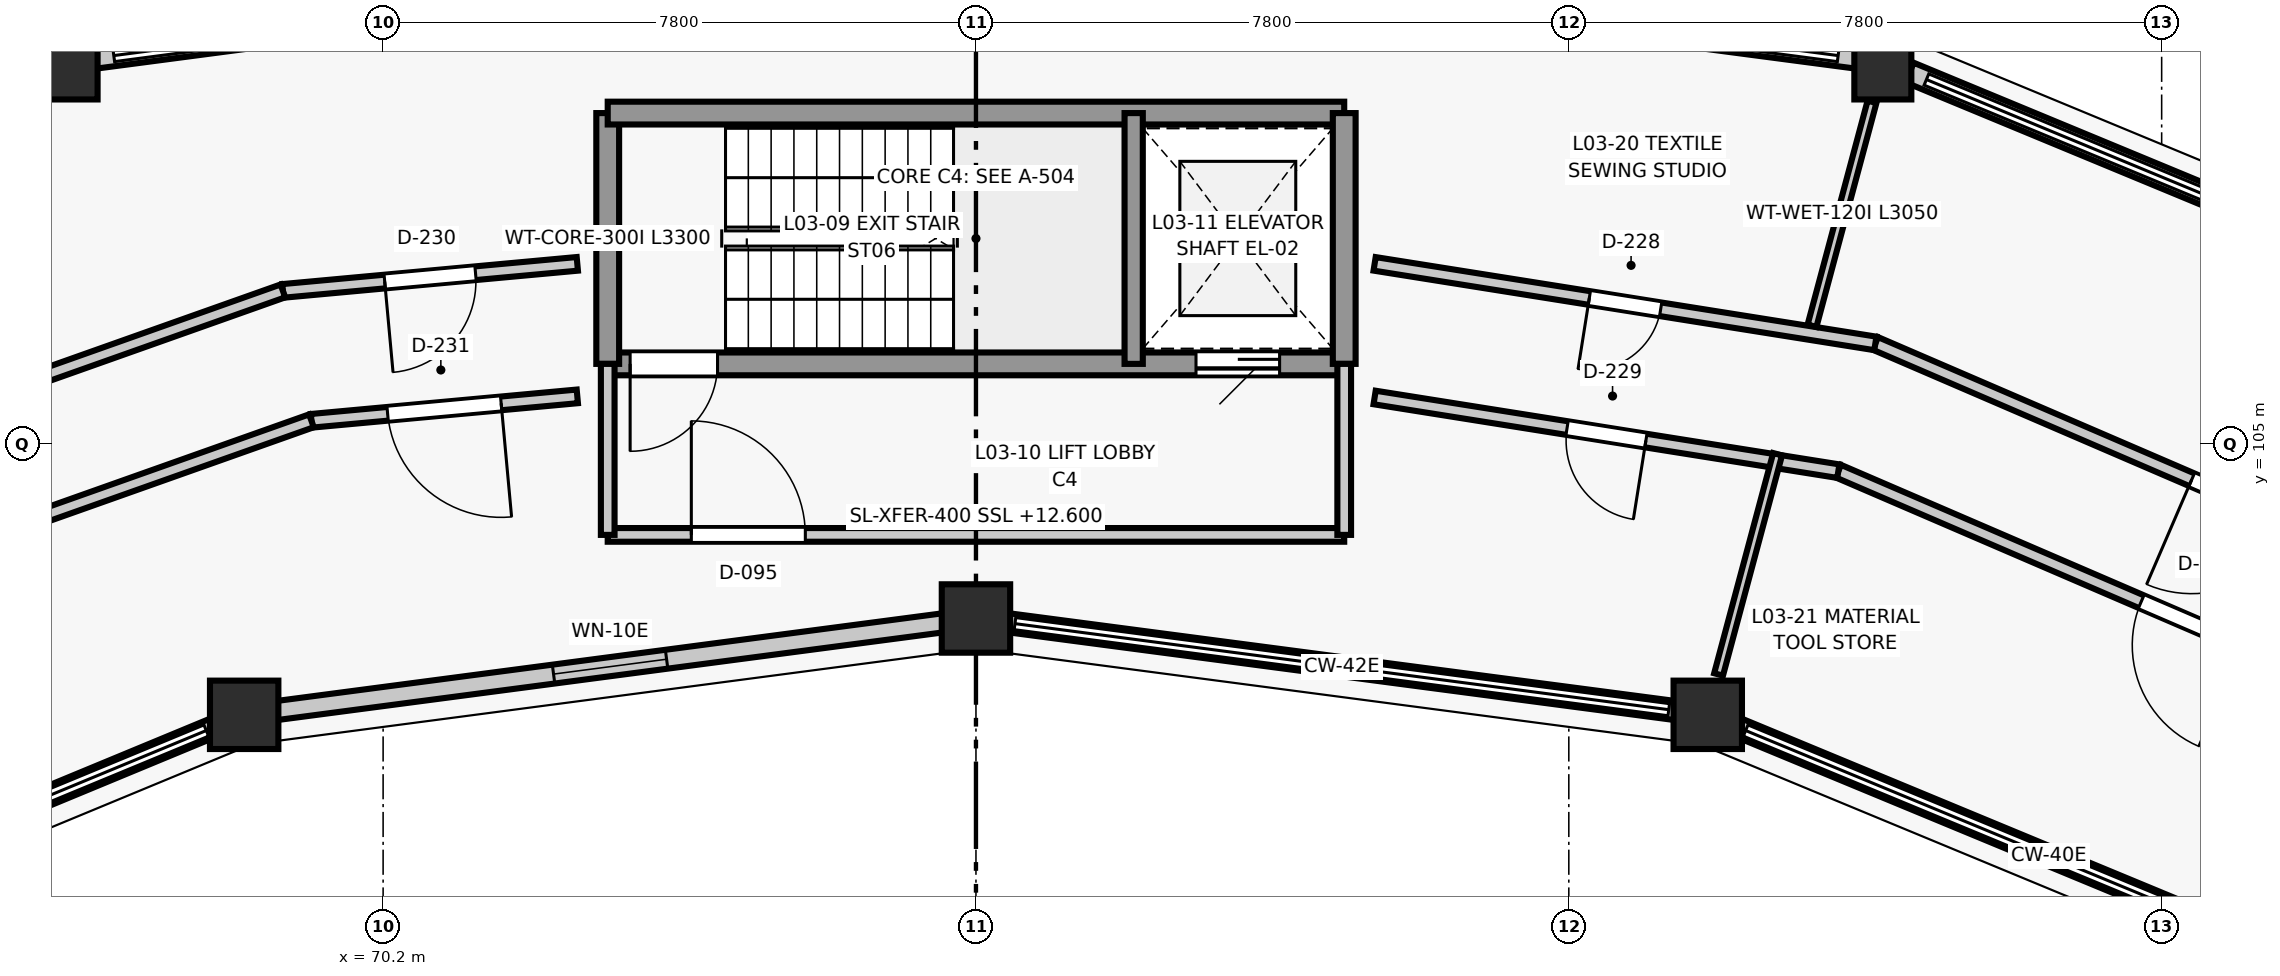
"""IFC4 building model, lengths in metres.
Left out: names, types, materials, properties, quantities, classifications, styles, units other than length and angle.
Written with IfcOpenShell. Run it as: python <this file> out.ifc"""

import sys

from ifc_helpers import new_model, si_unit, direction, frame, frame_2d, origin, origin_2d, place, context, subcontext, project, spatial, rectangle, circle, extrude, element, fill, save


model = new_model("IFC4")
c1 = context("Model", 3, precision=1e-05, world=origin(), true_north=direction((0.0, 1.0)))
c2 = subcontext(c1, "Body", "Model", "MODEL_VIEW")
j1 = project(units=[si_unit("LENGTHUNIT", "METRE"), si_unit("PLANEANGLEUNIT", "RADIAN")], contexts=[c1])
p1 = place(None, origin())
s1 = spatial("IfcSite", under=j1, at=p1, CompositionType="ELEMENT")
p2 = place(p1, origin())
s2 = spatial("IfcBuilding", under=s1, at=p2, CompositionType="ELEMENT")
p3 = place(p2, frame((0.0, 0.0, 12.6)))
s3 = spatial("IfcBuildingStorey", under=s2, at=p3, CompositionType="ELEMENT", Elevation=12.6)
for number, where, z_axis, x_axis in (
    (1, (87.628, 101.432, 0.0), (0.0, 0.0, 1.0), (1.0, 0.0, 0.0)),
    (2, (78.0, 102.7, 0.0), (0.0, 0.0, 1.0), (1.0, 0.0, 0.0)),
    (3, (68.372, 101.432, 0.0), (0.0, 0.0, 1.0), (1.0, 0.0, 0.0)),
):
    element("IfcColumn", number, at=place(p3, frame(where, z_axis=z_axis, x_axis=x_axis)), inside=s3, PredefinedType="COLUMN", context=c2, shape_type="SweptSolid", body=[
        extrude(circle(Radius=0.45, at=origin_2d()), origin(), (0.0, 0.0, 1.0), 3.9),
    ])
for number, where, z_axis, x_axis in (
    (4, (89.932, 110.029, 0.0), (0.0, 0.0, 1.0), (1.0, 0.0, 0.0)),
    (5, (66.068, 110.029, 0.0), (0.0, 0.0, 1.0), (1.0, 0.0, 0.0)),
):
    element("IfcColumn", number, at=place(p3, frame(where, z_axis=z_axis, x_axis=x_axis)), inside=s3, PredefinedType="COLUMN", context=c2, shape_type="SweptSolid", body=[
        extrude(rectangle(XDim=0.75, YDim=1.0, at=origin_2d()), origin(), (0.0, 0.0, 1.0), 3.9),
    ])
p4 = place(p3, frame((90.283, 109.883, 0.0), z_axis=(0.0, 0.0, 1.0), x_axis=(0.923883530636, -0.382673779896, 0.0)))
e6 = element("IfcWall", 6, at=p4, inside=s3, PredefinedType="STANDARD", context=c2, shape_type="SweptSolid", body=[
    extrude(rectangle(XDim=11.272, YDim=0.28, at=frame_2d((5.636, 0.0))), origin(), (0.0, 0.0, 1.0), 0.82),
])
p5 = place(p3, frame((96.323, 97.831, 0.0), z_axis=(0.0, 0.0, 1.0), x_axis=(-0.923880324771, 0.382681519675, 0.0)))
e7 = element("IfcWall", 7, at=p5, inside=s3, PredefinedType="STANDARD", context=c2, shape_type="SweptSolid", body=[
    extrude(rectangle(XDim=9.112, YDim=0.25, at=frame_2d((4.556, 0.0))), origin(), (0.0, 0.0, 1.0), 0.82),
])
p6 = place(p3, frame((78.35, 111.554, 0.0), z_axis=(0.0, 0.0, 1.0), x_axis=(0.991443215359, -0.130538694334, 0.0)))
e8 = element("IfcWall", 8, at=p6, inside=s3, PredefinedType="STANDARD", context=c2, shape_type="SweptSolid", body=[
    extrude(rectangle(XDim=11.328, YDim=0.28, at=frame_2d((5.664, 0.0))), origin(), (0.0, 0.0, 1.0), 0.82),
])
p7 = place(p3, frame((87.353, 101.469, 0.0), z_axis=(0.0, 0.0, 1.0), x_axis=(-0.991441766434, 0.130549698469, 0.0)))
e9 = element("IfcWall", 9, at=p7, inside=s3, PredefinedType="STANDARD", context=c2, shape_type="SweptSolid", body=[
    extrude(rectangle(XDim=9.156, YDim=0.25, at=frame_2d((4.578, 0.0))), origin(), (0.0, 0.0, 1.0), 0.82),
])
p8 = place(p3, frame((66.419, 110.075, 0.0), z_axis=(0.0, 0.0, 1.0), x_axis=(0.991443215359, 0.130538694334, 0.0)))
e10 = element("IfcWall", 10, at=p8, inside=s3, PredefinedType="STANDARD", context=c2, shape_type="SweptSolid", body=[
    extrude(rectangle(XDim=11.328, YDim=0.28, at=frame_2d((5.664, 0.0))), origin(), (0.0, 0.0, 1.0), 0.82),
])
p9 = place(p3, frame((77.725, 102.664, 0.0), z_axis=(0.0, 0.0, 1.0), x_axis=(-0.991441766434, -0.130549698469, 0.0)))
e11 = element("IfcWall", 11, at=p9, inside=s3, PredefinedType="STANDARD", context=c2, shape_type="SweptSolid", body=[
    extrude(rectangle(XDim=9.156, YDim=0.25, at=frame_2d((4.578, 0.0))), origin(), (0.0, 0.0, 1.0), 2.889),
])
p10 = place(p9, frame((3.828, 0.0, 0.85)))
e12 = element("IfcOpeningElement", 12, at=p10, cuts=e11, PredefinedType="OPENING", context=c2, shape_type="SweptSolid", body=[
    extrude(rectangle(XDim=1.5, YDim=1.55, at=frame_2d((0.75, 0.775))), frame((0.0, 0.135, 0.0), z_axis=(0.0, -1.0, 0.0), x_axis=(1.0, 0.0, 0.0)), (0.0, 0.0, 1.0), 0.27),
])
p11 = place(p3, frame((68.095, 101.318, 0.0), z_axis=(0.0, 0.0, 1.0), x_axis=(-0.923880324771, -0.382681519675, 0.0)))
e13 = element("IfcWall", 13, at=p11, inside=s3, PredefinedType="STANDARD", context=c2, shape_type="SweptSolid", body=[
    extrude(rectangle(XDim=9.112, YDim=0.25, at=frame_2d((4.556, 0.0))), origin(), (0.0, 0.0, 1.0), 0.82),
])
p12 = place(p3, frame((82.845, 106.05, 0.0), z_axis=(0.0, 0.0, 1.0), x_axis=(-1.0, 0.0, 0.0)))
e14 = element("IfcWall", 14, at=p12, inside=s3, PredefinedType="SHEAR", context=c2, shape_type="SweptSolid", body=[
    extrude(rectangle(XDim=9.69, YDim=0.3, at=frame_2d((4.845, 0.0))), origin(), (0.0, 0.0, 1.0), 3.9),
])
p13 = place(p12, frame((8.245, 0.0, 0.0)))
e15 = element("IfcOpeningElement", 15, at=p13, cuts=e14, PredefinedType="OPENING", context=c2, shape_type="SweptSolid", body=[
    extrude(rectangle(XDim=1.15, YDim=2.15, at=frame_2d((0.575, 1.075))), frame((0.0, 0.16, 0.0), z_axis=(0.0, -1.0, 0.0), x_axis=(1.0, 0.0, 0.0)), (0.0, 0.0, 1.0), 0.32),
])
p14 = place(p12, frame((0.85, 0.0, 0.0)))
e16 = element("IfcOpeningElement", 16, at=p14, cuts=e14, PredefinedType="OPENING", context=c2, shape_type="SweptSolid", body=[
    extrude(rectangle(XDim=1.1, YDim=2.15, at=frame_2d((0.55, 1.075))), frame((0.0, 0.16, 0.0), z_axis=(0.0, -1.0, 0.0), x_axis=(1.0, 0.0, 0.0)), (0.0, 0.0, 1.0), 0.32),
])
p15 = place(p3, frame((73.155, 106.05, 0.0), z_axis=(0.0, 0.0, 1.0), x_axis=(0.0, 1.0, 0.0)))
e17 = element("IfcWall", 17, at=p15, inside=s3, PredefinedType="SHEAR", context=c2, shape_type="SweptSolid", body=[
    extrude(rectangle(XDim=3.3, YDim=0.3, at=frame_2d((1.65, 0.0))), origin(), (0.0, 0.0, 1.0), 3.9),
])
p16 = place(p3, frame((73.155, 109.35, 0.0), z_axis=(0.0, 0.0, 1.0), x_axis=(1.0, 0.0, 0.0)))
e18 = element("IfcWall", 18, at=p16, inside=s3, PredefinedType="SHEAR", context=c2, shape_type="SweptSolid", body=[
    extrude(rectangle(XDim=9.69, YDim=0.3, at=frame_2d((4.845, 0.0))), origin(), (0.0, 0.0, 1.0), 3.9),
])
p17 = place(p3, frame((82.845, 109.35, 0.0), z_axis=(0.0, 0.0, 1.0), x_axis=(0.0, -1.0, 0.0)))
e19 = element("IfcWall", 19, at=p17, inside=s3, PredefinedType="SHEAR", context=c2, shape_type="SweptSolid", body=[
    extrude(rectangle(XDim=3.3, YDim=0.3, at=frame_2d((1.65, 0.0))), origin(), (0.0, 0.0, 1.0), 3.9),
])
p18 = place(p3, frame((80.075, 106.05, 0.0), z_axis=(0.0, 0.0, 1.0), x_axis=(0.0, 1.0, 0.0)))
e20 = element("IfcWall", 20, at=p18, inside=s3, PredefinedType="SHEAR", context=c2, shape_type="SweptSolid", body=[
    extrude(rectangle(XDim=3.3, YDim=0.24, at=frame_2d((1.65, 0.0))), origin(), (0.0, 0.0, 1.0), 3.9),
])
p19 = place(p3, frame((73.155, 103.8, 0.0), z_axis=(0.0, 0.0, 1.0), x_axis=(1.0, 0.0, 0.0)))
e21 = element("IfcWall", 21, at=p19, inside=s3, PredefinedType="PARTITIONING", context=c2, shape_type="SweptSolid", body=[
    extrude(rectangle(XDim=9.69, YDim=0.18, at=frame_2d((4.845, 0.0))), origin(), (0.0, 0.0, 1.0), 3.595),
])
p20 = place(p19, frame((1.1, 0.0, 0.0)))
e22 = element("IfcOpeningElement", 22, at=p20, cuts=e21, PredefinedType="OPENING", context=c2, shape_type="SweptSolid", body=[
    extrude(rectangle(XDim=1.5, YDim=2.15, at=frame_2d((0.75, 1.075))), frame((0.0, 0.1, 0.0), z_axis=(0.0, -1.0, 0.0), x_axis=(1.0, 0.0, 0.0)), (0.0, 0.0, 1.0), 0.2),
])
for number, where, z_axis, x_axis in (
    (23, (73.155, 106.05, 0.0), (0.0, 0.0, 1.0), (0.0, -1.0, 0.0)),
    (24, (82.845, 106.05, 0.0), (0.0, 0.0, 1.0), (0.0, -1.0, 0.0)),
):
    element("IfcWall", number, at=place(p3, frame(where, z_axis=z_axis, x_axis=x_axis)), inside=s3, PredefinedType="PARTITIONING", context=c2, shape_type="SweptSolid", body=[
        extrude(rectangle(XDim=2.25, YDim=0.18, at=frame_2d((1.125, 0.0))), origin(), (0.0, 0.0, 1.0), 3.595),
    ])
p21 = place(p3, frame((99.535, 102.14, 0.0), z_axis=(0.0, 0.0, 1.0), x_axis=(-0.918408223104, 0.395634093241, 0.0)))
e25 = element("IfcWall", 25, at=p21, inside=s3, PredefinedType="PARTITIONING", context=c2, shape_type="SweptSolid", body=[
    extrude(rectangle(XDim=10.563, YDim=0.18, at=frame_2d((5.282, 0.0))), origin(), (0.0, 0.0, 1.0), 3.595),
])
p22 = place(p21, frame((4.532, 0.0, 0.0)))
e26 = element("IfcOpeningElement", 26, at=p22, cuts=e25, PredefinedType="OPENING", context=c2, shape_type="SweptSolid", body=[
    extrude(rectangle(XDim=1.5, YDim=2.15, at=frame_2d((0.75, 1.075))), frame((0.0, 0.1, 0.0), z_axis=(0.0, -1.0, 0.0), x_axis=(1.0, 0.0, 0.0)), (0.0, 0.0, 1.0), 0.2),
])
p23 = place(p3, frame((98.648, 100.631, 0.0), z_axis=(0.0, 0.0, 1.0), x_axis=(-0.918401566602, 0.395649545004, 0.0)))
e27 = element("IfcWall", 27, at=p23, inside=s3, PredefinedType="PARTITIONING", context=c2, shape_type="SweptSolid", body=[
    extrude(rectangle(XDim=10.128, YDim=0.18, at=frame_2d((5.064, 0.0))), origin(), (0.0, 0.0, 1.0), 3.595),
])
p24 = place(p23, frame((4.339, 0.0, 0.0)))
e28 = element("IfcOpeningElement", 28, at=p24, cuts=e27, PredefinedType="OPENING", context=c2, shape_type="SweptSolid", body=[
    extrude(rectangle(XDim=1.45, YDim=2.2, at=frame_2d((0.725, 1.1))), frame((0.0, 0.1, 0.0), z_axis=(0.0, -1.0, 0.0), x_axis=(1.0, 0.0, 0.0)), (0.0, 0.0, 1.0), 0.2),
])
p25 = place(p3, frame((89.833, 106.319, 0.0), z_axis=(0.0, 0.0, 1.0), x_axis=(-0.987609972019, 0.156928465131, 0.0)))
e29 = element("IfcWall", 29, at=p25, inside=s3, PredefinedType="PARTITIONING", context=c2, shape_type="SweptSolid", body=[
    extrude(rectangle(XDim=6.671, YDim=0.18, at=frame_2d((3.335, 0.0))), origin(), (0.0, 0.0, 1.0), 3.595),
])
p26 = place(p25, frame((2.861, 0.0, 0.0)))
e30 = element("IfcOpeningElement", 30, at=p26, cuts=e29, PredefinedType="OPENING", context=c2, shape_type="SweptSolid", body=[
    extrude(rectangle(XDim=0.95, YDim=2.1, at=frame_2d((0.475, 1.05))), frame((0.0, 0.1, 0.0), z_axis=(0.0, -1.0, 0.0), x_axis=(1.0, 0.0, 0.0)), (0.0, 0.0, 1.0), 0.2),
])
p27 = place(p3, frame((89.346, 104.639, 0.0), z_axis=(0.0, 0.0, 1.0), x_axis=(-0.987615123726, 0.156896040064, 0.0)))
e31 = element("IfcWall", 31, at=p27, inside=s3, PredefinedType="PARTITIONING", context=c2, shape_type="SweptSolid", body=[
    extrude(rectangle(XDim=6.177, YDim=0.18, at=frame_2d((3.089, 0.0))), origin(), (0.0, 0.0, 1.0), 3.595),
])
p28 = place(p27, frame((2.564, 0.0, 0.0)))
e32 = element("IfcOpeningElement", 32, at=p28, cuts=e31, PredefinedType="OPENING", context=c2, shape_type="SweptSolid", body=[
    extrude(rectangle(XDim=1.05, YDim=2.1, at=frame_2d((0.525, 1.05))), frame((0.0, 0.1, 0.0), z_axis=(0.0, -1.0, 0.0), x_axis=(1.0, 0.0, 0.0)), (0.0, 0.0, 1.0), 0.2),
])
p29 = place(p3, frame((72.755, 107.366, 0.0), z_axis=(0.0, 0.0, 1.0), x_axis=(-0.995803193347, -0.09152049016, 0.0)))
e33 = element("IfcWall", 33, at=p29, inside=s3, PredefinedType="PARTITIONING", context=c2, shape_type="SweptSolid", body=[
    extrude(rectangle(XDim=3.889, YDim=0.18, at=frame_2d((1.945, 0.0))), origin(), (0.0, 0.0, 1.0), 3.595),
])
p30 = place(p29, frame((1.345, 0.0, 0.0)))
e34 = element("IfcOpeningElement", 34, at=p30, cuts=e33, PredefinedType="OPENING", context=c2, shape_type="SweptSolid", body=[
    extrude(rectangle(XDim=1.2, YDim=2.15, at=frame_2d((0.6, 1.075))), frame((0.0, 0.1, 0.0), z_axis=(0.0, -1.0, 0.0), x_axis=(1.0, 0.0, 0.0)), (0.0, 0.0, 1.0), 0.2),
])
p31 = place(p3, frame((72.755, 105.623, 0.0), z_axis=(0.0, 0.0, 1.0), x_axis=(-0.995800964817, -0.091544734794, 0.0)))
e35 = element("IfcWall", 35, at=p31, inside=s3, PredefinedType="PARTITIONING", context=c2, shape_type="SweptSolid", body=[
    extrude(rectangle(XDim=3.512, YDim=0.18, at=frame_2d((1.756, 0.0))), origin(), (0.0, 0.0, 1.0), 3.595),
])
p32 = place(p31, frame((1.006, 0.0, 0.0)))
e36 = element("IfcOpeningElement", 36, at=p32, cuts=e35, PredefinedType="OPENING", context=c2, shape_type="SweptSolid", body=[
    extrude(rectangle(XDim=1.5, YDim=2.15, at=frame_2d((0.75, 1.075))), frame((0.0, 0.1, 0.0), z_axis=(0.0, -1.0, 0.0), x_axis=(1.0, 0.0, 0.0)), (0.0, 0.0, 1.0), 0.2),
])
p33 = place(p3, frame((68.882, 107.01, 0.0), z_axis=(0.0, 0.0, 1.0), x_axis=(-0.942485767708, -0.334246282954, 0.0)))
e37 = element("IfcWall", 37, at=p33, inside=s3, PredefinedType="PARTITIONING", context=c2, shape_type="SweptSolid", body=[
    extrude(rectangle(XDim=10.563, YDim=0.18, at=frame_2d((5.282, 0.0))), origin(), (0.0, 0.0, 1.0), 3.595),
])
p34 = place(p33, frame((4.557, 0.0, 0.0)))
e38 = element("IfcOpeningElement", 38, at=p34, cuts=e37, PredefinedType="OPENING", context=c2, shape_type="SweptSolid", body=[
    extrude(rectangle(XDim=1.45, YDim=2.2, at=frame_2d((0.725, 1.1))), frame((0.0, 0.1, 0.0), z_axis=(0.0, -1.0, 0.0), x_axis=(1.0, 0.0, 0.0)), (0.0, 0.0, 1.0), 0.2),
])
p35 = place(p3, frame((69.257, 105.301, 0.0), z_axis=(0.0, 0.0, 1.0), x_axis=(-0.942482379954, -0.334255835366, 0.0)))
e39 = element("IfcWall", 39, at=p35, inside=s3, PredefinedType="PARTITIONING", context=c2, shape_type="SweptSolid", body=[
    extrude(rectangle(XDim=10.128, YDim=0.18, at=frame_2d((5.064, 0.0))), origin(), (0.0, 0.0, 1.0), 3.595),
])
p36 = place(p35, frame((4.589, 0.0, 0.0)))
e40 = element("IfcOpeningElement", 40, at=p36, cuts=e39, PredefinedType="OPENING", context=c2, shape_type="SweptSolid", body=[
    extrude(rectangle(XDim=0.95, YDim=2.1, at=frame_2d((0.475, 1.05))), frame((0.0, 0.1, 0.0), z_axis=(0.0, -1.0, 0.0), x_axis=(1.0, 0.0, 0.0)), (0.0, 0.0, 1.0), 0.2),
])
p37 = place(p3, frame((89.0, 106.552, 0.0), z_axis=(0.0, 0.0, 1.0), x_axis=(0.258868119081, 0.96591267562, 0.0)))
e41 = element("IfcWall", 41, at=p37, inside=s3, PredefinedType="PARTITIONING", context=c2, shape_type="SweptSolid", body=[
    extrude(rectangle(XDim=3.05, YDim=0.12, at=frame_2d((1.525, 0.0))), origin(), (0.0, 0.0, 1.0), 2.957),
])
p38 = place(p3, frame((87.771, 101.964, 0.0), z_axis=(0.0, 0.0, 1.0), x_axis=(0.258776761059, 0.965937155273, 0.0)))
e42 = element("IfcWall", 42, at=p38, inside=s3, PredefinedType="PARTITIONING", context=c2, shape_type="SweptSolid", body=[
    extrude(rectangle(XDim=3.0, YDim=0.12, at=frame_2d((1.5, 0.0))), origin(), (0.0, 0.0, 1.0), 2.957),
])
p39 = place(p10, origin())
e43 = element("IfcWindow", 43, at=p39, inside=s3, PartitioningType="SINGLE_PANEL", PredefinedType="WINDOW", context=c2, shape_type="SweptSolid", body=[
    extrude(rectangle(XDim=1.5, YDim=1.55, at=frame_2d((0.75, 0.775))), frame((0.0, 0.03, 0.0), z_axis=(0.0, -1.0, 0.0), x_axis=(1.0, 0.0, 0.0)), (0.0, 0.0, 1.0), 0.06),
])
fill(e12, e43)
p40 = place(p13, origin())
e44 = element("IfcDoor", 44, at=p40, inside=s3, OperationType="SINGLE_SWING_RIGHT", PredefinedType="DOOR", context=c2, shape_type="SweptSolid", body=[
    extrude(rectangle(XDim=1.15, YDim=2.15, at=frame_2d((0.575, 1.075))), frame((0.0, 0.025, 0.0), z_axis=(0.0, -1.0, 0.0), x_axis=(1.0, 0.0, 0.0)), (0.0, 0.0, 1.0), 0.05),
])
fill(e15, e44)
p41 = place(p14, origin())
e45 = element("IfcDoor", 45, at=p41, inside=s3, OperationType="SLIDING_TO_LEFT", PredefinedType="DOOR", context=c2, shape_type="SweptSolid", body=[
    extrude(rectangle(XDim=1.1, YDim=2.15, at=frame_2d((0.55, 1.075))), frame((0.0, 0.025, 0.0), z_axis=(0.0, -1.0, 0.0), x_axis=(1.0, 0.0, 0.0)), (0.0, 0.0, 1.0), 0.05),
])
fill(e16, e45)
p42 = place(p20, origin())
e46 = element("IfcDoor", 46, at=p42, inside=s3, OperationType="SINGLE_SWING_LEFT", PredefinedType="DOOR", context=c2, shape_type="SweptSolid", body=[
    extrude(rectangle(XDim=1.5, YDim=2.15, at=frame_2d((0.75, 1.075))), frame((0.0, 0.025, 0.0), z_axis=(0.0, -1.0, 0.0), x_axis=(1.0, 0.0, 0.0)), (0.0, 0.0, 1.0), 0.05),
])
fill(e22, e46)
p43 = place(p22, origin())
e47 = element("IfcDoor", 47, at=p43, inside=s3, OperationType="SINGLE_SWING_RIGHT", PredefinedType="DOOR", context=c2, shape_type="SweptSolid", body=[
    extrude(rectangle(XDim=1.5, YDim=2.15, at=frame_2d((0.75, 1.075))), frame((0.0, 0.025, 0.0), z_axis=(0.0, -1.0, 0.0), x_axis=(1.0, 0.0, 0.0)), (0.0, 0.0, 1.0), 0.05),
])
fill(e26, e47)
p44 = place(p24, origin())
e48 = element("IfcDoor", 48, at=p44, inside=s3, OperationType="SINGLE_SWING_LEFT", PredefinedType="DOOR", context=c2, shape_type="SweptSolid", body=[
    extrude(rectangle(XDim=1.45, YDim=2.2, at=frame_2d((0.725, 1.1))), frame((0.0, 0.025, 0.0), z_axis=(0.0, -1.0, 0.0), x_axis=(1.0, 0.0, 0.0)), (0.0, 0.0, 1.0), 0.05),
])
fill(e28, e48)
p45 = place(p26, origin())
e49 = element("IfcDoor", 49, at=p45, inside=s3, OperationType="SINGLE_SWING_RIGHT", PredefinedType="DOOR", context=c2, shape_type="SweptSolid", body=[
    extrude(rectangle(XDim=0.95, YDim=2.1, at=frame_2d((0.475, 1.05))), frame((0.0, 0.025, 0.0), z_axis=(0.0, -1.0, 0.0), x_axis=(1.0, 0.0, 0.0)), (0.0, 0.0, 1.0), 0.05),
])
fill(e30, e49)
p46 = place(p28, origin())
e50 = element("IfcDoor", 50, at=p46, inside=s3, OperationType="SINGLE_SWING_LEFT", PredefinedType="DOOR", context=c2, shape_type="SweptSolid", body=[
    extrude(rectangle(XDim=1.05, YDim=2.1, at=frame_2d((0.525, 1.05))), frame((0.0, 0.025, 0.0), z_axis=(0.0, -1.0, 0.0), x_axis=(1.0, 0.0, 0.0)), (0.0, 0.0, 1.0), 0.05),
])
fill(e32, e50)
p47 = place(p30, origin())
e51 = element("IfcDoor", 51, at=p47, inside=s3, OperationType="SINGLE_SWING_RIGHT", PredefinedType="DOOR", context=c2, shape_type="SweptSolid", body=[
    extrude(rectangle(XDim=1.2, YDim=2.15, at=frame_2d((0.6, 1.075))), frame((0.0, 0.025, 0.0), z_axis=(0.0, -1.0, 0.0), x_axis=(1.0, 0.0, 0.0)), (0.0, 0.0, 1.0), 0.05),
])
fill(e34, e51)
p48 = place(p32, origin())
e52 = element("IfcDoor", 52, at=p48, inside=s3, OperationType="SINGLE_SWING_LEFT", PredefinedType="DOOR", context=c2, shape_type="SweptSolid", body=[
    extrude(rectangle(XDim=1.5, YDim=2.15, at=frame_2d((0.75, 1.075))), frame((0.0, 0.025, 0.0), z_axis=(0.0, -1.0, 0.0), x_axis=(1.0, 0.0, 0.0)), (0.0, 0.0, 1.0), 0.05),
])
fill(e36, e52)
save(model, sys.argv[1])
